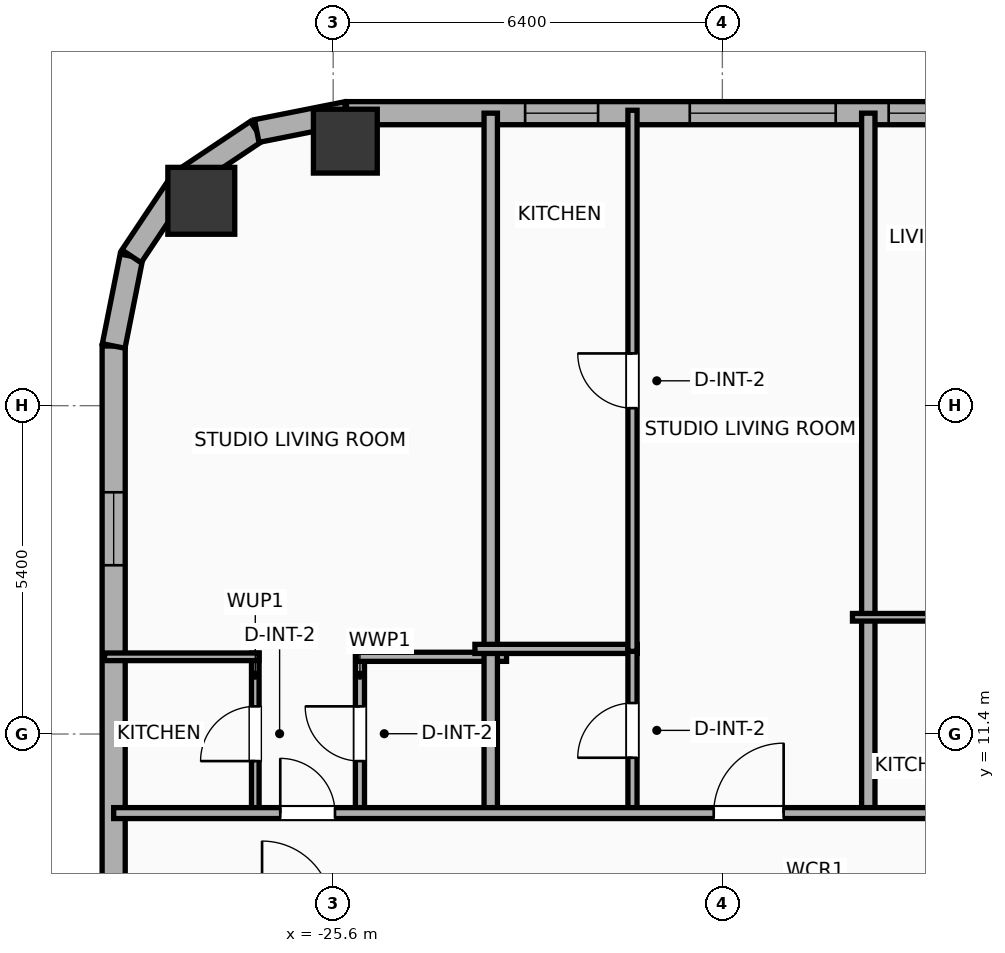
"""IFC4 building model, lengths in metres.
Left out: names, types, materials, properties, quantities, classifications, styles, units other than length and angle.
Written with IfcOpenShell. Run it as: python <this file> out.ifc"""

import sys

from ifc_helpers import new_model, si_unit, direction, frame, frame_2d, origin, origin_2d, place, context, subcontext, project, spatial, rectangle, hollow_rectangle, hollow_circle, extrude, element, fill, save


model = new_model("IFC4")
c1 = context("Model", 3, precision=1e-05, world=origin(), true_north=direction((0.0, 1.0)))
c2 = subcontext(c1, "Body", "Model", "MODEL_VIEW")
j1 = project(units=[si_unit("LENGTHUNIT", "METRE"), si_unit("PLANEANGLEUNIT", "RADIAN")], contexts=[c1])
p1 = place(None, origin())
s1 = spatial("IfcSite", under=j1, at=p1, CompositionType="ELEMENT")
p2 = place(p1, origin())
s2 = spatial("IfcBuilding", under=s1, at=p2, CompositionType="ELEMENT")
p3 = place(p2, frame((0.0, 0.0, 136.5)))
s3 = spatial("IfcBuildingStorey", under=s2, at=p3, CompositionType="ELEMENT", Elevation=136.5)
p4 = place(p3, frame((-25.4, 21.15, 0.0), z_axis=(0.0, 0.0, 1.0), x_axis=(1.0, 0.0, 0.0)))
e1 = element("IfcColumn", 1, at=p4, inside=s3, PredefinedType="COLUMN", context=c2, shape_type="SweptSolid", body=[
    extrude(hollow_rectangle(XDim=1.05, YDim=1.05, WallThickness=0.036, at=origin_2d()), origin(), (0.0, 0.0, 1.0), 3.865),
])
p5 = place(p3, frame((-27.769, 20.169, 0.0), z_axis=(0.0, 0.0, 1.0), x_axis=(1.0, 0.0, 0.0)))
e2 = element("IfcColumn", 2, at=p5, inside=s3, PredefinedType="COLUMN", context=c2, shape_type="SweptSolid", body=[
    extrude(hollow_circle(Radius=0.55, WallThickness=0.036, at=origin_2d()), origin(), (0.0, 0.0, 1.0), 3.865),
])
p6 = place(p3, frame((-29.21, -16.581, 0.0), z_axis=(0.0, 0.0, 1.0), x_axis=(0.0, 1.0, 0.0)))
e3 = element("IfcWall", 3, at=p6, inside=s3, PredefinedType="ELEMENTEDWALL", context=c2, shape_type="SweptSolid", body=[
    extrude(rectangle(XDim=34.363, YDim=0.38, at=frame_2d((17.181, 0.0))), origin(), (0.0, 0.0, 1.0), 2.39),
])
p7 = place(p6, frame((30.757, 0.0, 0.55)))
e4 = element("IfcOpeningElement", 4, at=p7, cuts=e3, PredefinedType="OPENING", context=c2, shape_type="SweptSolid", body=[
    extrude(rectangle(XDim=1.2, YDim=1.15, at=frame_2d((0.6, 0.575))), frame((0.0, 0.2, 0.0), z_axis=(0.0, -1.0, 0.0), x_axis=(1.0, 0.0, 0.0)), (0.0, 0.0, 1.0), 0.4),
])
p8 = place(p6, frame((20.326, 0.0, 0.55)))
e5 = element("IfcOpeningElement", 5, at=p8, cuts=e3, PredefinedType="OPENING", context=c2, shape_type="SweptSolid", body=[
    extrude(rectangle(XDim=1.2, YDim=1.15, at=frame_2d((0.6, 0.575))), frame((0.0, 0.2, 0.0), z_axis=(0.0, -1.0, 0.0), x_axis=(1.0, 0.0, 0.0)), (0.0, 0.0, 1.0), 0.4),
])
p9 = place(p6, frame((11.776, 0.0, 0.55)))
e6 = element("IfcOpeningElement", 6, at=p9, cuts=e3, PredefinedType="OPENING", context=c2, shape_type="SweptSolid", body=[
    extrude(rectangle(XDim=1.2, YDim=1.15, at=frame_2d((0.6, 0.575))), frame((0.0, 0.2, 0.0), z_axis=(0.0, -1.0, 0.0), x_axis=(1.0, 0.0, 0.0)), (0.0, 0.0, 1.0), 0.4),
])
p10 = place(p3, frame((-29.21, 17.781, 0.0), z_axis=(0.0, 0.0, 1.0), x_axis=(0.195086038585, 0.980786132421, 0.0)))
e7 = element("IfcWall", 7, at=p10, inside=s3, PredefinedType="ELEMENTEDWALL", context=c2, shape_type="SweptSolid", body=[
    extrude(rectangle(XDim=1.504, YDim=0.38, at=frame_2d((0.752, 0.0))), origin(), (0.0, 0.0, 1.0), 3.5),
])
p11 = place(p3, frame((-28.917, 19.257, 0.0), z_axis=(0.0, 0.0, 1.0), x_axis=(0.555610286119, 0.831442848281, 0.0)))
e8 = element("IfcWall", 8, at=p11, inside=s3, PredefinedType="ELEMENTEDWALL", context=c2, shape_type="SweptSolid", body=[
    extrude(rectangle(XDim=1.485, YDim=0.38, at=frame_2d((0.743, 0.0))), origin(), (0.0, 0.0, 1.0), 2.39),
])
p12 = place(p3, frame((-28.091, 20.491, 0.0), z_axis=(0.0, 0.0, 1.0), x_axis=(0.831468045563, 0.555572577804, 0.0)))
e9 = element("IfcWall", 9, at=p12, inside=s3, PredefinedType="ELEMENTEDWALL", context=c2, shape_type="SweptSolid", body=[
    extrude(rectangle(XDim=1.485, YDim=0.38, at=frame_2d((0.742, 0.0))), origin(), (0.0, 0.0, 1.0), 2.39),
])
p13 = place(p3, frame((-26.857, 21.316, 0.0), z_axis=(0.0, 0.0, 1.0), x_axis=(0.980755066645, 0.195242155415, 0.0)))
e10 = element("IfcWall", 10, at=p13, inside=s3, PredefinedType="ELEMENTEDWALL", context=c2, shape_type="SweptSolid", body=[
    extrude(rectangle(XDim=1.504, YDim=0.38, at=frame_2d((0.752, 0.0))), origin(), (0.0, 0.0, 1.0), 2.39),
])
p14 = place(p3, frame((-25.381, 21.61, 0.0), z_axis=(0.0, 0.0, 1.0), x_axis=(1.0, 0.0, 0.0)))
e11 = element("IfcWall", 11, at=p14, inside=s3, PredefinedType="ELEMENTEDWALL", context=c2, shape_type="SweptSolid", body=[
    extrude(rectangle(XDim=54.763, YDim=0.38, at=frame_2d((27.381, 0.0))), origin(), (0.0, 0.0, 1.0), 2.39),
])
p15 = place(p14, frame((5.645, 0.0, 0.75)))
e12 = element("IfcOpeningElement", 12, at=p15, cuts=e11, PredefinedType="OPENING", context=c2, shape_type="SweptSolid", body=[
    extrude(rectangle(XDim=2.4, YDim=1.45, at=frame_2d((1.2, 0.725))), frame((0.0, 0.2, 0.0), z_axis=(0.0, -1.0, 0.0), x_axis=(1.0, 0.0, 0.0)), (0.0, 0.0, 1.0), 0.4),
])
p16 = place(p14, frame((34.677, 0.0, 0.75)))
e13 = element("IfcOpeningElement", 13, at=p16, cuts=e11, PredefinedType="OPENING", context=c2, shape_type="SweptSolid", body=[
    extrude(rectangle(XDim=2.4, YDim=1.45, at=frame_2d((1.2, 0.725))), frame((0.0, 0.2, 0.0), z_axis=(0.0, -1.0, 0.0), x_axis=(1.0, 0.0, 0.0)), (0.0, 0.0, 1.0), 0.4),
])
p17 = place(p14, frame((45.067, 0.0, 0.75)))
e14 = element("IfcOpeningElement", 14, at=p17, cuts=e11, PredefinedType="OPENING", context=c2, shape_type="SweptSolid", body=[
    extrude(rectangle(XDim=2.4, YDim=1.45, at=frame_2d((1.2, 0.725))), frame((0.0, 0.2, 0.0), z_axis=(0.0, -1.0, 0.0), x_axis=(1.0, 0.0, 0.0)), (0.0, 0.0, 1.0), 0.4),
])
p18 = place(p14, frame((2.938, 0.0, 0.55)))
e15 = element("IfcOpeningElement", 15, at=p18, cuts=e11, PredefinedType="OPENING", context=c2, shape_type="SweptSolid", body=[
    extrude(rectangle(XDim=1.2, YDim=1.15, at=frame_2d((0.6, 0.575))), frame((0.0, 0.2, 0.0), z_axis=(0.0, -1.0, 0.0), x_axis=(1.0, 0.0, 0.0)), (0.0, 0.0, 1.0), 0.4),
])
p19 = place(p14, frame((8.916, 0.0, 0.55)))
e16 = element("IfcOpeningElement", 16, at=p19, cuts=e11, PredefinedType="OPENING", context=c2, shape_type="SweptSolid", body=[
    extrude(rectangle(XDim=1.2, YDim=1.15, at=frame_2d((0.6, 0.575))), frame((0.0, 0.2, 0.0), z_axis=(0.0, -1.0, 0.0), x_axis=(1.0, 0.0, 0.0)), (0.0, 0.0, 1.0), 0.4),
])
p20 = place(p14, frame((13.476, 0.0, 0.55)))
e17 = element("IfcOpeningElement", 17, at=p20, cuts=e11, PredefinedType="OPENING", context=c2, shape_type="SweptSolid", body=[
    extrude(rectangle(XDim=1.2, YDim=1.15, at=frame_2d((0.6, 0.575))), frame((0.0, 0.2, 0.0), z_axis=(0.0, -1.0, 0.0), x_axis=(1.0, 0.0, 0.0)), (0.0, 0.0, 1.0), 0.4),
])
p21 = place(p14, frame((17.076, 0.0, 0.55)))
e18 = element("IfcOpeningElement", 18, at=p21, cuts=e11, PredefinedType="OPENING", context=c2, shape_type="SweptSolid", body=[
    extrude(rectangle(XDim=1.2, YDim=1.15, at=frame_2d((0.6, 0.575))), frame((0.0, 0.2, 0.0), z_axis=(0.0, -1.0, 0.0), x_axis=(1.0, 0.0, 0.0)), (0.0, 0.0, 1.0), 0.4),
])
p22 = place(p14, frame((19.956, 0.0, 0.55)))
e19 = element("IfcOpeningElement", 19, at=p22, cuts=e11, PredefinedType="OPENING", context=c2, shape_type="SweptSolid", body=[
    extrude(rectangle(XDim=1.2, YDim=1.15, at=frame_2d((0.6, 0.575))), frame((0.0, 0.2, 0.0), z_axis=(0.0, -1.0, 0.0), x_axis=(1.0, 0.0, 0.0)), (0.0, 0.0, 1.0), 0.4),
])
p23 = place(p14, frame((24.276, 0.0, 0.55)))
e20 = element("IfcOpeningElement", 20, at=p23, cuts=e11, PredefinedType="OPENING", context=c2, shape_type="SweptSolid", body=[
    extrude(rectangle(XDim=1.2, YDim=1.15, at=frame_2d((0.6, 0.575))), frame((0.0, 0.2, 0.0), z_axis=(0.0, -1.0, 0.0), x_axis=(1.0, 0.0, 0.0)), (0.0, 0.0, 1.0), 0.4),
])
p24 = place(p14, frame((27.876, 0.0, 0.55)))
e21 = element("IfcOpeningElement", 21, at=p24, cuts=e11, PredefinedType="OPENING", context=c2, shape_type="SweptSolid", body=[
    extrude(rectangle(XDim=1.2, YDim=1.15, at=frame_2d((0.6, 0.575))), frame((0.0, 0.2, 0.0), z_axis=(0.0, -1.0, 0.0), x_axis=(1.0, 0.0, 0.0)), (0.0, 0.0, 1.0), 0.4),
])
p25 = place(p14, frame((30.876, 0.0, 0.55)))
e22 = element("IfcOpeningElement", 22, at=p25, cuts=e11, PredefinedType="OPENING", context=c2, shape_type="SweptSolid", body=[
    extrude(rectangle(XDim=1.2, YDim=1.15, at=frame_2d((0.6, 0.575))), frame((0.0, 0.2, 0.0), z_axis=(0.0, -1.0, 0.0), x_axis=(1.0, 0.0, 0.0)), (0.0, 0.0, 1.0), 0.4),
])
p26 = place(p14, frame((38.676, 0.0, 0.55)))
e23 = element("IfcOpeningElement", 23, at=p26, cuts=e11, PredefinedType="OPENING", context=c2, shape_type="SweptSolid", body=[
    extrude(rectangle(XDim=1.2, YDim=1.15, at=frame_2d((0.6, 0.575))), frame((0.0, 0.2, 0.0), z_axis=(0.0, -1.0, 0.0), x_axis=(1.0, 0.0, 0.0)), (0.0, 0.0, 1.0), 0.4),
])
p27 = place(p14, frame((41.796, 0.0, 0.55)))
e24 = element("IfcOpeningElement", 24, at=p27, cuts=e11, PredefinedType="OPENING", context=c2, shape_type="SweptSolid", body=[
    extrude(rectangle(XDim=1.2, YDim=1.15, at=frame_2d((0.6, 0.575))), frame((0.0, 0.2, 0.0), z_axis=(0.0, -1.0, 0.0), x_axis=(1.0, 0.0, 0.0)), (0.0, 0.0, 1.0), 0.4),
])
p28 = place(p14, frame((49.476, 0.0, 0.55)))
e25 = element("IfcOpeningElement", 25, at=p28, cuts=e11, PredefinedType="OPENING", context=c2, shape_type="SweptSolid", body=[
    extrude(rectangle(XDim=1.2, YDim=1.15, at=frame_2d((0.6, 0.575))), frame((0.0, 0.2, 0.0), z_axis=(0.0, -1.0, 0.0), x_axis=(1.0, 0.0, 0.0)), (0.0, 0.0, 1.0), 0.4),
])
p29 = place(p14, frame((52.227, 0.0, 0.55)))
e26 = element("IfcOpeningElement", 26, at=p29, cuts=e11, PredefinedType="OPENING", context=c2, shape_type="SweptSolid", body=[
    extrude(rectangle(XDim=1.2, YDim=1.15, at=frame_2d((0.6, 0.575))), frame((0.0, 0.2, 0.0), z_axis=(0.0, -1.0, 0.0), x_axis=(1.0, 0.0, 0.0)), (0.0, 0.0, 1.0), 0.4),
])
p30 = place(p3, frame((-26.881, 10.08, 0.0), z_axis=(0.0, 0.0, 1.0), x_axis=(0.0, 1.0, 0.0)))
e27 = element("IfcWall", 27, at=p30, inside=s3, PredefinedType="PARTITIONING", context=c2, shape_type="SweptSolid", body=[
    extrude(rectangle(XDim=2.65, YDim=0.125, at=frame_2d((1.325, 0.0))), origin(), (0.0, 0.0, 1.0), 3.5),
])
p31 = place(p30, frame((0.875, 0.0, 0.0)))
e28 = element("IfcOpeningElement", 28, at=p31, cuts=e27, PredefinedType="OPENING", context=c2, shape_type="SweptSolid", body=[
    extrude(rectangle(XDim=0.9, YDim=2.05, at=frame_2d((0.45, 1.025))), frame((0.0, 0.073, 0.0), z_axis=(0.0, -1.0, 0.0), x_axis=(1.0, 0.0, 0.0)), (0.0, 0.0, 1.0), 0.145),
])
p32 = place(p3, frame((-25.16, 10.08, 0.0), z_axis=(0.0, 0.0, 1.0), x_axis=(0.0, 1.0, 0.0)))
e29 = element("IfcWall", 29, at=p32, inside=s3, PredefinedType="PLUMBINGWALL", context=c2, shape_type="SweptSolid", body=[
    extrude(rectangle(XDim=2.65, YDim=0.15, at=frame_2d((1.325, 0.0))), origin(), (0.0, 0.0, 1.0), 3.5),
])
p33 = place(p32, frame((0.875, 0.0, 0.0)))
e30 = element("IfcOpeningElement", 30, at=p33, cuts=e29, PredefinedType="OPENING", context=c2, shape_type="SweptSolid", body=[
    extrude(rectangle(XDim=0.9, YDim=2.05, at=frame_2d((0.45, 1.025))), frame((0.0, 0.085, 0.0), z_axis=(0.0, -1.0, 0.0), x_axis=(1.0, 0.0, 0.0)), (0.0, 0.0, 1.0), 0.17),
])
p34 = place(p3, frame((-29.36, 12.67, 0.0), z_axis=(0.0, 0.0, 1.0), x_axis=(1.0, 0.0, 0.0)))
e31 = element("IfcWall", 31, at=p34, inside=s3, PredefinedType="PARTITIONING", context=c2, shape_type="SweptSolid", body=[
    extrude(rectangle(XDim=2.539, YDim=0.125, at=frame_2d((1.27, 0.0))), origin(), (0.0, 0.0, 1.0), 3.5),
])
p35 = place(p3, frame((-25.22, 12.67, 0.0), z_axis=(0.0, 0.0, 1.0), x_axis=(1.0, 0.0, 0.0)))
e32 = element("IfcWall", 32, at=p35, inside=s3, PredefinedType="PLUMBINGWALL", context=c2, shape_type="SweptSolid", body=[
    extrude(rectangle(XDim=2.471, YDim=0.15, at=frame_2d((1.235, 0.0))), origin(), (0.0, 0.0, 1.0), 3.5),
])
p36 = place(p3, frame((-23.009, 10.02, 0.0), z_axis=(0.0, 0.0, 1.0), x_axis=(0.0, 1.0, 0.0)))
e33 = element("IfcWall", 33, at=p36, inside=s3, PredefinedType="PARTITIONING", context=c2, shape_type="SweptSolid", body=[
    extrude(rectangle(XDim=11.59, YDim=0.22, at=frame_2d((5.795, 0.0))), origin(), (0.0, 0.0, 1.0), 3.5),
])
p37 = place(p3, frame((-23.269, 12.8, 0.0), z_axis=(0.0, 0.0, 1.0), x_axis=(1.0, 0.0, 0.0)))
e34 = element("IfcWall", 34, at=p37, inside=s3, PredefinedType="PLUMBINGWALL", context=c2, shape_type="SweptSolid", body=[
    extrude(rectangle(XDim=2.671, YDim=0.15, at=frame_2d((1.335, 0.0))), origin(), (0.0, 0.0, 1.0), 3.5),
])
p38 = place(p3, frame((-20.678, 10.08, 0.0), z_axis=(0.0, 0.0, 1.0), x_axis=(0.0, 1.0, 0.0)))
e35 = element("IfcWall", 35, at=p38, inside=s3, PredefinedType="PLUMBINGWALL", context=c2, shape_type="SweptSolid", body=[
    extrude(rectangle(XDim=2.76, YDim=0.15, at=frame_2d((1.38, 0.0))), origin(), (0.0, 0.0, 1.0), 3.5),
])
p39 = place(p38, frame((0.93, 0.0, 0.0)))
e36 = element("IfcOpeningElement", 36, at=p39, cuts=e35, PredefinedType="OPENING", context=c2, shape_type="SweptSolid", body=[
    extrude(rectangle(XDim=0.9, YDim=2.05, at=frame_2d((0.45, 1.025))), frame((0.0, 0.085, 0.0), z_axis=(0.0, -1.0, 0.0), x_axis=(1.0, 0.0, 0.0)), (0.0, 0.0, 1.0), 0.17),
])
p40 = place(p3, frame((-20.678, 12.76, 0.0), z_axis=(0.0, 0.0, 1.0), x_axis=(0.0, 1.0, 0.0)))
e37 = element("IfcWall", 37, at=p40, inside=s3, PredefinedType="PLUMBINGWALL", context=c2, shape_type="SweptSolid", body=[
    extrude(rectangle(XDim=8.898, YDim=0.15, at=frame_2d((4.449, 0.0))), origin(), (0.0, 0.0, 1.0), 2.39),
])
p41 = place(p40, frame((3.999, 0.0, 0.0)))
e38 = element("IfcOpeningElement", 38, at=p41, cuts=e37, PredefinedType="OPENING", context=c2, shape_type="SweptSolid", body=[
    extrude(rectangle(XDim=0.9, YDim=2.05, at=frame_2d((0.45, 1.025))), frame((0.0, 0.085, 0.0), z_axis=(0.0, -1.0, 0.0), x_axis=(1.0, 0.0, 0.0)), (0.0, 0.0, 1.0), 0.17),
])
p42 = place(p3, frame((-16.8, 10.02, 0.0), z_axis=(0.0, 0.0, 1.0), x_axis=(0.0, 1.0, 0.0)))
e39 = element("IfcWall", 39, at=p42, inside=s3, PredefinedType="PARTITIONING", context=c2, shape_type="SweptSolid", body=[
    extrude(rectangle(XDim=11.59, YDim=0.22, at=frame_2d((5.795, 0.0))), origin(), (0.0, 0.0, 1.0), 3.5),
])
p43 = place(p3, frame((-17.06, 13.32, 0.0), z_axis=(0.0, 0.0, 1.0), x_axis=(1.0, 0.0, 0.0)))
e40 = element("IfcWall", 40, at=p43, inside=s3, PredefinedType="PARTITIONING", context=c2, shape_type="SweptSolid", body=[
    extrude(rectangle(XDim=2.69, YDim=0.125, at=frame_2d((1.345, 0.0))), origin(), (0.0, 0.0, 1.0), 3.5),
])
p44 = place(p3, frame((-29.21, 10.1, 0.0), z_axis=(0.0, 0.0, 1.0), x_axis=(1.0, 0.0, 0.0)))
e41 = element("IfcWall", 41, at=p44, inside=s3, PredefinedType="PARTITIONING", context=c2, shape_type="SweptSolid", body=[
    extrude(rectangle(XDim=62.42, YDim=0.18, at=frame_2d((31.21, 0.0))), origin(), (0.0, 0.0, 1.0), 2.39),
])
p45 = place(p44, frame((2.74, 0.0, 0.0)))
e42 = element("IfcOpeningElement", 42, at=p45, cuts=e41, PredefinedType="OPENING", context=c2, shape_type="SweptSolid", body=[
    extrude(rectangle(XDim=0.9, YDim=2.05, at=frame_2d((0.45, 1.025))), frame((0.0, 0.1, 0.0), z_axis=(0.0, -1.0, 0.0), x_axis=(1.0, 0.0, 0.0)), (0.0, 0.0, 1.0), 0.2),
])
p46 = place(p44, frame((9.868, 0.0, 0.0)))
e43 = element("IfcOpeningElement", 43, at=p46, cuts=e41, PredefinedType="OPENING", context=c2, shape_type="SweptSolid", body=[
    extrude(rectangle(XDim=1.15, YDim=2.05, at=frame_2d((0.575, 1.025))), frame((0.0, 0.1, 0.0), z_axis=(0.0, -1.0, 0.0), x_axis=(1.0, 0.0, 0.0)), (0.0, 0.0, 1.0), 0.2),
])
p47 = place(p44, frame((15.598, 0.0, 0.0)))
e44 = element("IfcOpeningElement", 44, at=p47, cuts=e41, PredefinedType="OPENING", context=c2, shape_type="SweptSolid", body=[
    extrude(rectangle(XDim=1.15, YDim=2.05, at=frame_2d((0.575, 1.025))), frame((0.0, 0.1, 0.0), z_axis=(0.0, -1.0, 0.0), x_axis=(1.0, 0.0, 0.0)), (0.0, 0.0, 1.0), 0.2),
])
p48 = place(p44, frame((22.801, 0.0, 0.0)))
e45 = element("IfcOpeningElement", 45, at=p48, cuts=e41, PredefinedType="OPENING", context=c2, shape_type="SweptSolid", body=[
    extrude(rectangle(XDim=1.15, YDim=2.05, at=frame_2d((0.575, 1.025))), frame((0.0, 0.1, 0.0), z_axis=(0.0, -1.0, 0.0), x_axis=(1.0, 0.0, 0.0)), (0.0, 0.0, 1.0), 0.2),
])
p49 = place(p44, frame((29.998, 0.0, 0.0)))
e46 = element("IfcOpeningElement", 46, at=p49, cuts=e41, PredefinedType="OPENING", context=c2, shape_type="SweptSolid", body=[
    extrude(rectangle(XDim=1.15, YDim=2.05, at=frame_2d((0.575, 1.025))), frame((0.0, 0.1, 0.0), z_axis=(0.0, -1.0, 0.0), x_axis=(1.0, 0.0, 0.0)), (0.0, 0.0, 1.0), 0.2),
])
p50 = place(p44, frame((37.202, 0.0, 0.0)))
e47 = element("IfcOpeningElement", 47, at=p50, cuts=e41, PredefinedType="OPENING", context=c2, shape_type="SweptSolid", body=[
    extrude(rectangle(XDim=1.15, YDim=2.05, at=frame_2d((0.575, 1.025))), frame((0.0, 0.1, 0.0), z_axis=(0.0, -1.0, 0.0), x_axis=(1.0, 0.0, 0.0)), (0.0, 0.0, 1.0), 0.2),
])
p51 = place(p44, frame((44.399, 0.0, 0.0)))
e48 = element("IfcOpeningElement", 48, at=p51, cuts=e41, PredefinedType="OPENING", context=c2, shape_type="SweptSolid", body=[
    extrude(rectangle(XDim=1.15, YDim=2.05, at=frame_2d((0.575, 1.025))), frame((0.0, 0.1, 0.0), z_axis=(0.0, -1.0, 0.0), x_axis=(1.0, 0.0, 0.0)), (0.0, 0.0, 1.0), 0.2),
])
p52 = place(p44, frame((51.602, 0.0, 0.0)))
e49 = element("IfcOpeningElement", 49, at=p52, cuts=e41, PredefinedType="OPENING", context=c2, shape_type="SweptSolid", body=[
    extrude(rectangle(XDim=1.15, YDim=2.05, at=frame_2d((0.575, 1.025))), frame((0.0, 0.1, 0.0), z_axis=(0.0, -1.0, 0.0), x_axis=(1.0, 0.0, 0.0)), (0.0, 0.0, 1.0), 0.2),
])
p53 = place(p44, frame((58.762, 0.0, 0.0)))
e50 = element("IfcOpeningElement", 50, at=p53, cuts=e41, PredefinedType="OPENING", context=c2, shape_type="SweptSolid", body=[
    extrude(rectangle(XDim=0.9, YDim=2.05, at=frame_2d((0.45, 1.025))), frame((0.0, 0.1, 0.0), z_axis=(0.0, -1.0, 0.0), x_axis=(1.0, 0.0, 0.0)), (0.0, 0.0, 1.0), 0.2),
])
p54 = place(p15, origin())
e51 = element("IfcWindow", 51, at=p54, inside=s3, PartitioningType="SINGLE_PANEL", PredefinedType="WINDOW", context=c2, shape_type="SweptSolid", body=[
    extrude(rectangle(XDim=2.4, YDim=1.45, at=frame_2d((1.2, 0.725))), frame((0.0, 0.03, 0.0), z_axis=(0.0, -1.0, 0.0), x_axis=(1.0, 0.0, 0.0)), (0.0, 0.0, 1.0), 0.06),
])
fill(e12, e51)
p55 = place(p7, origin())
e52 = element("IfcWindow", 52, at=p55, inside=s3, PartitioningType="SINGLE_PANEL", PredefinedType="WINDOW", context=c2, shape_type="SweptSolid", body=[
    extrude(rectangle(XDim=1.2, YDim=1.15, at=frame_2d((0.6, 0.575))), frame((0.0, 0.03, 0.0), z_axis=(0.0, -1.0, 0.0), x_axis=(1.0, 0.0, 0.0)), (0.0, 0.0, 1.0), 0.06),
])
fill(e4, e52)
p56 = place(p18, origin())
e53 = element("IfcWindow", 53, at=p56, inside=s3, PartitioningType="SINGLE_PANEL", PredefinedType="WINDOW", context=c2, shape_type="SweptSolid", body=[
    extrude(rectangle(XDim=1.2, YDim=1.15, at=frame_2d((0.6, 0.575))), frame((0.0, 0.03, 0.0), z_axis=(0.0, -1.0, 0.0), x_axis=(1.0, 0.0, 0.0)), (0.0, 0.0, 1.0), 0.06),
])
fill(e15, e53)
p57 = place(p19, origin())
e54 = element("IfcWindow", 54, at=p57, inside=s3, PartitioningType="SINGLE_PANEL", PredefinedType="WINDOW", context=c2, shape_type="SweptSolid", body=[
    extrude(rectangle(XDim=1.2, YDim=1.15, at=frame_2d((0.6, 0.575))), frame((0.0, 0.03, 0.0), z_axis=(0.0, -1.0, 0.0), x_axis=(1.0, 0.0, 0.0)), (0.0, 0.0, 1.0), 0.06),
])
fill(e16, e54)
p58 = place(p31, origin())
e55 = element("IfcDoor", 55, at=p58, inside=s3, OperationType="SINGLE_SWING_LEFT", PredefinedType="DOOR", context=c2, shape_type="SweptSolid", body=[
    extrude(rectangle(XDim=0.9, YDim=2.05, at=frame_2d((0.45, 1.025))), frame((0.0, 0.025, 0.0), z_axis=(0.0, -1.0, 0.0), x_axis=(1.0, 0.0, 0.0)), (0.0, 0.0, 1.0), 0.05),
])
fill(e28, e55)
p59 = place(p33, origin())
e56 = element("IfcDoor", 56, at=p59, inside=s3, OperationType="SINGLE_SWING_RIGHT", PredefinedType="DOOR", context=c2, shape_type="SweptSolid", body=[
    extrude(rectangle(XDim=0.9, YDim=2.05, at=frame_2d((0.45, 1.025))), frame((0.0, 0.025, 0.0), z_axis=(0.0, -1.0, 0.0), x_axis=(1.0, 0.0, 0.0)), (0.0, 0.0, 1.0), 0.05),
])
fill(e30, e56)
p60 = place(p39, origin())
e57 = element("IfcDoor", 57, at=p60, inside=s3, OperationType="SINGLE_SWING_LEFT", PredefinedType="DOOR", context=c2, shape_type="SweptSolid", body=[
    extrude(rectangle(XDim=0.9, YDim=2.05, at=frame_2d((0.45, 1.025))), frame((0.0, 0.025, 0.0), z_axis=(0.0, -1.0, 0.0), x_axis=(1.0, 0.0, 0.0)), (0.0, 0.0, 1.0), 0.05),
])
fill(e36, e57)
p61 = place(p41, origin())
e58 = element("IfcDoor", 58, at=p61, inside=s3, OperationType="SINGLE_SWING_RIGHT", PredefinedType="DOOR", context=c2, shape_type="SweptSolid", body=[
    extrude(rectangle(XDim=0.9, YDim=2.05, at=frame_2d((0.45, 1.025))), frame((0.0, 0.025, 0.0), z_axis=(0.0, -1.0, 0.0), x_axis=(1.0, 0.0, 0.0)), (0.0, 0.0, 1.0), 0.05),
])
fill(e38, e58)
p62 = place(p45, origin())
e59 = element("IfcDoor", 59, at=p62, inside=s3, OperationType="SINGLE_SWING_LEFT", PredefinedType="DOOR", context=c2, shape_type="SweptSolid", body=[
    extrude(rectangle(XDim=0.9, YDim=2.05, at=frame_2d((0.45, 1.025))), frame((0.0, 0.025, 0.0), z_axis=(0.0, -1.0, 0.0), x_axis=(1.0, 0.0, 0.0)), (0.0, 0.0, 1.0), 0.05),
])
fill(e42, e59)
p63 = place(p46, origin())
e60 = element("IfcDoor", 60, at=p63, inside=s3, OperationType="SINGLE_SWING_RIGHT", PredefinedType="DOOR", context=c2, shape_type="SweptSolid", body=[
    extrude(rectangle(XDim=1.15, YDim=2.05, at=frame_2d((0.575, 1.025))), frame((0.0, 0.025, 0.0), z_axis=(0.0, -1.0, 0.0), x_axis=(1.0, 0.0, 0.0)), (0.0, 0.0, 1.0), 0.05),
])
fill(e43, e60)
save(model, sys.argv[1])
